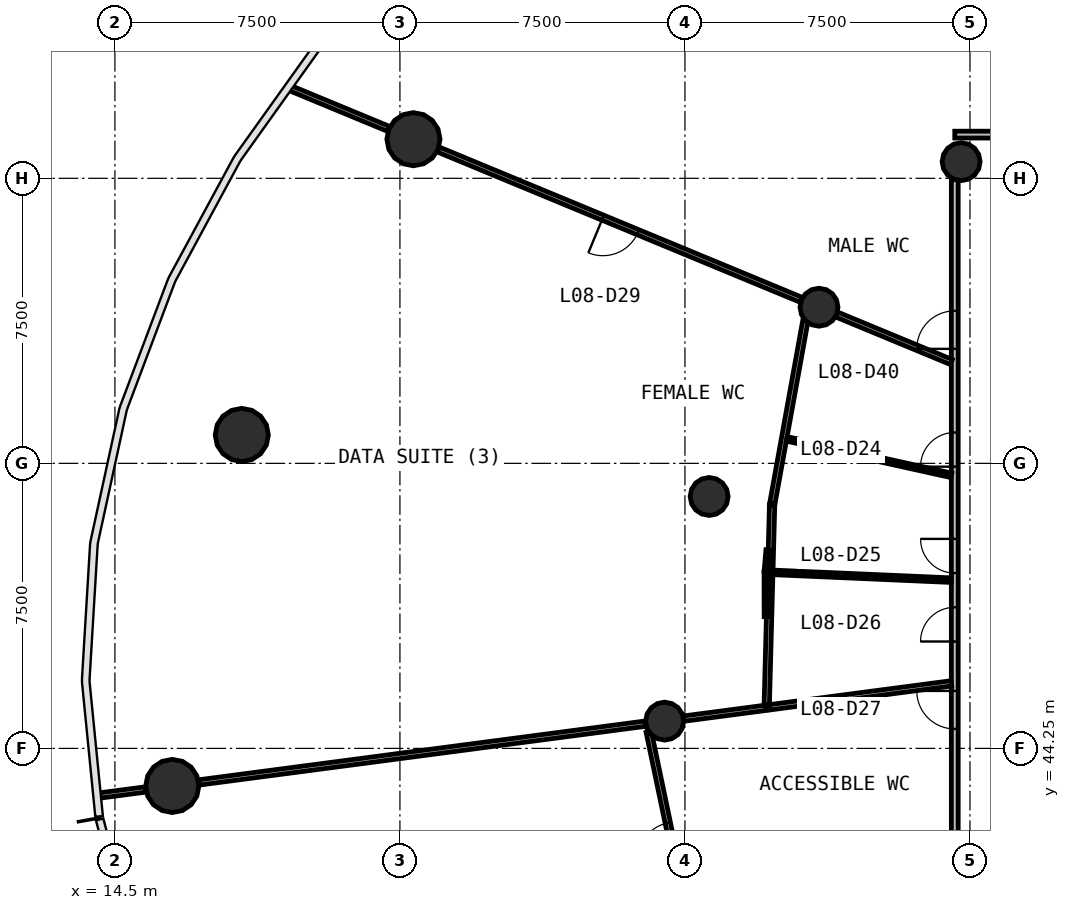
"""IFC4 building model, lengths in metres.
Left out: names, types, materials, properties, quantities, classifications, styles, units other than length and angle.
Written with IfcOpenShell. Run it as: python <this file> out.ifc"""

import sys

from ifc_helpers import new_model, si_unit, direction, frame, frame_2d, origin, origin_2d, place, context, subcontext, project, spatial, rectangle, circle, extrude, source, transform, mapped, element, fill, save


model = new_model("IFC4")
c1 = context("Model", 3, precision=1e-05, world=origin(), true_north=direction((0.0, 1.0)))
c2 = subcontext(c1, "Body", "Model", "MODEL_VIEW")
j1 = project(units=[si_unit("LENGTHUNIT", "METRE"), si_unit("PLANEANGLEUNIT", "RADIAN")], contexts=[c1])
p1 = place(None, origin())
s1 = spatial("IfcSite", under=j1, at=p1, CompositionType="ELEMENT")
p2 = place(p1, origin())
s2 = spatial("IfcBuilding", under=s1, at=p2, CompositionType="ELEMENT")
p3 = place(p2, frame((0.0, 0.0, 35.8)))
s3 = spatial("IfcBuildingStorey", under=s2, at=p3, CompositionType="ELEMENT", Elevation=35.8)
m1 = source(origin(), c2, "Body", "SweptSolid", [
    extrude(circle(Radius=0.7, at=origin_2d()), origin(), (0.0, 0.0, 1.0), 4.4),
])
for number, where, z_axis, x_axis in (
    (1, (22.355, 60.279, 0.0), (0.0, 0.0, 1.0), (1.0, 0.0, 0.0)),
    (2, (17.839, 52.497, 0.0), (0.0, 0.0, 1.0), (1.0, 0.0, 0.0)),
    (3, (16.01, 43.262, 0.0), (0.0, 0.0, 1.0), (1.0, 0.0, 0.0)),
):
    element("IfcColumn", number, at=place(p3, frame(where, z_axis=z_axis, x_axis=x_axis)), inside=s3, PredefinedType="COLUMN", context=c2, shape_type="MappedRepresentation", body=[
        mapped(m1, transform((0.0, 0.0, 0.0), scale=1.0)),
    ])
m2 = source(origin(), c2, "Body", "SweptSolid", [
    extrude(circle(Radius=0.5, at=origin_2d()), origin(), (0.0, 0.0, 1.0), 4.4),
])
for number, where, z_axis, x_axis in (
    (4, (36.768, 59.688, 0.0), (0.0, 0.0, 1.0), (1.0, 0.0, 0.0)),
    (5, (33.028, 55.859, 0.0), (0.0, 0.0, 1.0), (1.0, 0.0, 0.0)),
    (6, (30.137, 50.878, 0.0), (0.0, 0.0, 1.0), (1.0, 0.0, 0.0)),
    (7, (28.966, 44.968, 0.0), (0.0, 0.0, 1.0), (1.0, 0.0, 0.0)),
):
    element("IfcColumn", number, at=place(p3, frame(where, z_axis=z_axis, x_axis=x_axis)), inside=s3, PredefinedType="COLUMN", context=c2, shape_type="MappedRepresentation", body=[
        mapped(m2, transform((0.0, 0.0, 0.0), scale=1.0)),
    ])
p4 = place(p3, frame((36.6, 60.4, 0.0), z_axis=(0.0, 0.0, 1.0), x_axis=(1.0, 0.0, 0.0)))
e8 = element("IfcWall", 8, at=p4, inside=s3, PredefinedType="PARTITIONING", context=c2, shape_type="SweptSolid", body=[
    extrude(rectangle(XDim=30.8, YDim=0.18, at=frame_2d((15.4, 0.0))), origin(), (0.0, 0.0, 1.0), 3.05),
])
p5 = place(p4, frame((20.95, 0.0, 0.0)))
e9 = element("IfcOpeningElement", 9, at=p5, cuts=e8, PredefinedType="OPENING", context=c2, shape_type="SweptSolid", body=[
    extrude(rectangle(XDim=1.0, YDim=2.1, at=frame_2d((0.5, 1.05))), frame((0.0, 0.1, 0.0), z_axis=(0.0, -1.0, 0.0), x_axis=(1.0, 0.0, 0.0)), (0.0, 0.0, 1.0), 0.2),
])
p6 = place(p4, frame((14.95, 0.0, 0.0)))
e10 = element("IfcOpeningElement", 10, at=p6, cuts=e8, PredefinedType="OPENING", context=c2, shape_type="SweptSolid", body=[
    extrude(rectangle(XDim=1.0, YDim=2.1, at=frame_2d((0.5, 1.05))), frame((0.0, 0.1, 0.0), z_axis=(0.0, -1.0, 0.0), x_axis=(1.0, 0.0, 0.0)), (0.0, 0.0, 1.0), 0.2),
])
p7 = place(p3, frame((36.6, 35.63, 0.0), z_axis=(0.0, 0.0, 1.0), x_axis=(0.0, 1.0, 0.0)))
e11 = element("IfcWall", 11, at=p7, inside=s3, PredefinedType="PARTITIONING", context=c2, shape_type="SweptSolid", body=[
    extrude(rectangle(XDim=23.583, YDim=0.18, at=frame_2d((11.791, 0.0))), origin(), (0.0, 0.0, 1.0), 3.05),
])
p8 = place(p7, frame((16.032, 0.0, 0.0)))
e12 = element("IfcOpeningElement", 12, at=p8, cuts=e11, PredefinedType="OPENING", context=c2, shape_type="SweptSolid", body=[
    extrude(rectangle(XDim=0.9, YDim=2.1, at=frame_2d((0.45, 1.05))), frame((0.0, 0.1, 0.0), z_axis=(0.0, -1.0, 0.0), x_axis=(1.0, 0.0, 0.0)), (0.0, 0.0, 1.0), 0.2),
])
p9 = place(p7, frame((13.232, 0.0, 0.0)))
e13 = element("IfcOpeningElement", 13, at=p9, cuts=e11, PredefinedType="OPENING", context=c2, shape_type="SweptSolid", body=[
    extrude(rectangle(XDim=0.9, YDim=2.1, at=frame_2d((0.45, 1.05))), frame((0.0, 0.1, 0.0), z_axis=(0.0, -1.0, 0.0), x_axis=(1.0, 0.0, 0.0)), (0.0, 0.0, 1.0), 0.2),
])
p10 = place(p7, frame((11.433, 0.0, 0.0)))
e14 = element("IfcOpeningElement", 14, at=p10, cuts=e11, PredefinedType="OPENING", context=c2, shape_type="SweptSolid", body=[
    extrude(rectangle(XDim=0.9, YDim=2.1, at=frame_2d((0.45, 1.05))), frame((0.0, 0.1, 0.0), z_axis=(0.0, -1.0, 0.0), x_axis=(1.0, 0.0, 0.0)), (0.0, 0.0, 1.0), 0.2),
])
p11 = place(p7, frame((9.133, 0.0, 0.0)))
e15 = element("IfcOpeningElement", 15, at=p11, cuts=e11, PredefinedType="OPENING", context=c2, shape_type="SweptSolid", body=[
    extrude(rectangle(XDim=1.0, YDim=2.1, at=frame_2d((0.5, 1.05))), frame((0.0, 0.1, 0.0), z_axis=(0.0, -1.0, 0.0), x_axis=(1.0, 0.0, 0.0)), (0.0, 0.0, 1.0), 0.2),
])
p12 = place(p7, frame((19.133, 0.0, 0.0)))
e16 = element("IfcOpeningElement", 16, at=p12, cuts=e11, PredefinedType="OPENING", context=c2, shape_type="SweptSolid", body=[
    extrude(rectangle(XDim=1.0, YDim=2.1, at=frame_2d((0.5, 1.05))), frame((0.0, 0.1, 0.0), z_axis=(0.0, -1.0, 0.0), x_axis=(1.0, 0.0, 0.0)), (0.0, 0.0, 1.0), 0.2),
])
p13 = place(p3, frame((28.466, 44.902, 0.0), z_axis=(0.0, 0.0, 1.0), x_axis=(-0.991446586451, -0.130513088287, 0.0)))
e17 = element("IfcWall", 17, at=p13, inside=s3, PredefinedType="PARTITIONING", context=c2, shape_type="SweptSolid", body=[
    extrude(rectangle(XDim=11.86, YDim=0.14, at=frame_2d((5.93, 0.0))), origin(), (0.0, 0.0, 1.0), 3.05),
])
p14 = place(p3, frame((32.561, 56.052, 0.0), z_axis=(0.0, 0.0, 1.0), x_axis=(-0.923874685699, 0.382695133396, 0.0)))
e18 = element("IfcWall", 18, at=p14, inside=s3, PredefinedType="PARTITIONING", context=c2, shape_type="SweptSolid", body=[
    extrude(rectangle(XDim=10.341, YDim=0.14, at=frame_2d((5.17, 0.0))), origin(), (0.0, 0.0, 1.0), 3.05),
])
p15 = place(p14, frame((4.65, 0.0, 0.0)))
e19 = element("IfcOpeningElement", 19, at=p15, cuts=e18, PredefinedType="OPENING", context=c2, shape_type="SweptSolid", body=[
    extrude(rectangle(XDim=1.0, YDim=2.1, at=frame_2d((0.5, 1.05))), frame((0.0, 0.08, 0.0), z_axis=(0.0, -1.0, 0.0), x_axis=(1.0, 0.0, 0.0)), (0.0, 0.0, 1.0), 0.16),
])
p16 = place(p3, frame((29.774, 38.826, 0.0), z_axis=(0.0, 0.0, 1.0), x_axis=(-0.20499122911, 0.978763810113, 0.0)))
e20 = element("IfcWall", 20, at=p16, inside=s3, PredefinedType="PARTITIONING", context=c2, shape_type="SweptSolid", body=[
    extrude(rectangle(XDim=5.988, YDim=0.14, at=frame_2d((2.994, 0.0))), origin(), (0.0, 0.0, 1.0), 3.05),
])
p17 = place(p16, frame((2.538, 0.0, 0.0)))
e21 = element("IfcOpeningElement", 21, at=p17, cuts=e20, PredefinedType="OPENING", context=c2, shape_type="SweptSolid", body=[
    extrude(rectangle(XDim=1.0, YDim=2.1, at=frame_2d((0.5, 1.05))), frame((0.0, 0.08, 0.0), z_axis=(0.0, -1.0, 0.0), x_axis=(1.0, 0.0, 0.0)), (0.0, 0.0, 1.0), 0.16),
])
p18 = place(p3, frame((31.793, 50.66, 0.0), z_axis=(0.0, 0.0, 1.0), x_axis=(-0.026785082404, -0.999641215317, 0.0)))
e22 = element("IfcWall", 22, at=p18, inside=s3, PredefinedType="PARTITIONING", context=c2, shape_type="SweptSolid", body=[
    extrude(rectangle(XDim=5.341, YDim=0.14, at=frame_2d((2.671, 0.0))), origin(), (0.0, 0.0, 1.0), 3.05),
])
p19 = place(p3, frame((36.51, 45.961, 0.0), z_axis=(0.0, 0.0, 1.0), x_axis=(-0.991443283178, -0.130538179246, 0.0)))
e23 = element("IfcWall", 23, at=p19, inside=s3, PredefinedType="PARTITIONING", context=c2, shape_type="SweptSolid", body=[
    extrude(rectangle(XDim=4.831, YDim=0.14, at=frame_2d((2.416, 0.0))), origin(), (0.0, 0.0, 1.0), 3.05),
])
p20 = place(p3, frame((32.669, 55.503, 0.0), z_axis=(0.0, 0.0, 1.0), x_axis=(-0.178046403734, -0.984022092291, 0.0)))
e24 = element("IfcWall", 24, at=p20, inside=s3, PredefinedType="PARTITIONING", context=c2, shape_type="SweptSolid", body=[
    extrude(rectangle(XDim=4.891, YDim=0.14, at=frame_2d((2.446, 0.0))), origin(), (0.0, 0.0, 1.0), 3.05),
])
p21 = place(p3, frame((36.51, 54.416, 0.0), z_axis=(0.0, 0.0, 1.0), x_axis=(-0.923911109142, 0.382607190737, 0.0)))
e25 = element("IfcWall", 25, at=p21, inside=s3, PredefinedType="PARTITIONING", context=c2, shape_type="SweptSolid", body=[
    extrude(rectangle(XDim=3.264, YDim=0.14, at=frame_2d((1.632, 0.0))), origin(), (0.0, 0.0, 1.0), 3.05),
])
p22 = place(p3, frame((21.704, 60.549, 0.0), z_axis=(0.0, 0.0, 1.0), x_axis=(-0.923906214347, 0.382619010363, 0.0)))
e26 = element("IfcWall", 26, at=p22, inside=s3, PredefinedType="PARTITIONING", context=c2, shape_type="SweptSolid", body=[
    extrude(rectangle(XDim=2.797, YDim=0.14, at=frame_2d((1.399, 0.0))), origin(), (0.0, 0.0, 1.0), 3.05),
])
p23 = place(p3, frame((31.621, 45.317, 0.0), z_axis=(0.0, 0.0, 1.0), x_axis=(-0.991455060392, -0.130448699582, 0.0)))
e27 = element("IfcWall", 27, at=p23, inside=s3, PredefinedType="PARTITIONING", context=c2, shape_type="SweptSolid", body=[
    extrude(rectangle(XDim=2.173, YDim=0.14, at=frame_2d((1.086, 0.0))), origin(), (0.0, 0.0, 1.0), 3.05),
])
p24 = place(p3, frame((15.311, 43.17, 0.0), z_axis=(0.0, 0.0, 1.0), x_axis=(-0.991431129538, -0.130630453508, 0.0)))
e28 = element("IfcWall", 28, at=p24, inside=s3, PredefinedType="PARTITIONING", context=c2, shape_type="SweptSolid", body=[
    extrude(rectangle(XDim=1.22, YDim=0.14, at=frame_2d((0.61, 0.0))), origin(), (0.0, 0.0, 1.0), 3.05),
])
p25 = place(p3, frame((36.51, 48.676, 0.0), z_axis=(0.0, 0.0, 1.0), x_axis=(-0.999047117706, 0.043644662933, 0.0)))
e29 = element("IfcWall", 29, at=p25, inside=s3, PredefinedType="PARTITIONING", context=c2, shape_type="SweptSolid", body=[
    extrude(rectangle(XDim=4.699, YDim=0.12, at=frame_2d((2.349, 0.0))), origin(), (0.0, 0.0, 1.0), 3.05),
])
p26 = place(p3, frame((36.51, 51.434, 0.0), z_axis=(0.0, 0.0, 1.0), x_axis=(-0.976302150535, 0.216411900922, 0.0)))
e30 = element("IfcWall", 30, at=p26, inside=s3, PredefinedType="PARTITIONING", context=c2, shape_type="SweptSolid", body=[
    extrude(rectangle(XDim=4.437, YDim=0.12, at=frame_2d((2.219, 0.0))), origin(), (0.0, 0.0, 1.0), 3.05),
])
p27 = place(p3, frame((31.642, 48.889, 0.0), z_axis=(0.0, 0.0, 1.0), x_axis=(0.002289275999, -0.999997379604, 0.0)))
e31 = element("IfcWall", 31, at=p27, inside=s3, PredefinedType="PARTITIONING", context=c2, shape_type="SweptSolid", body=[
    extrude(rectangle(XDim=1.173, YDim=0.12, at=frame_2d((0.586, 0.0))), origin(), (0.0, 0.0, 1.0), 3.05),
])
p28 = place(p3, frame((31.691, 49.471, 0.0), z_axis=(0.0, 0.0, 1.0), x_axis=(-0.084976539901, -0.996382952316, 0.0)))
e32 = element("IfcWall", 32, at=p28, inside=s3, PredefinedType="PARTITIONING", context=c2, shape_type="SweptSolid", body=[
    extrude(rectangle(XDim=0.554, YDim=0.12, at=frame_2d((0.277, 0.0))), origin(), (0.0, 0.0, 1.0), 3.05),
])
m3 = source(origin(), c2, "Body", "SweptSolid", [
    extrude(rectangle(XDim=0.9, YDim=2.1, at=frame_2d((0.45, 1.05))), frame((0.0, 0.025, 0.0), z_axis=(0.0, -1.0, 0.0), x_axis=(1.0, 0.0, 0.0)), (0.0, 0.0, 1.0), 0.05),
])
p29 = place(p8, origin())
e33 = element("IfcDoor", 33, at=p29, inside=s3, OperationType="SINGLE_SWING_LEFT", PredefinedType="DOOR", context=c2, shape_type="MappedRepresentation", body=[
    mapped(m3, transform((0.0, 0.0, 0.0), scale=1.0)),
])
fill(e12, e33)
p30 = place(p9, origin())
e34 = element("IfcDoor", 34, at=p30, inside=s3, OperationType="SINGLE_SWING_RIGHT", PredefinedType="DOOR", context=c2, shape_type="MappedRepresentation", body=[
    mapped(m3, transform((0.0, 0.0, 0.0), scale=1.0)),
])
fill(e13, e34)
p31 = place(p10, origin())
e35 = element("IfcDoor", 35, at=p31, inside=s3, OperationType="SINGLE_SWING_LEFT", PredefinedType="DOOR", context=c2, shape_type="MappedRepresentation", body=[
    mapped(m3, transform((0.0, 0.0, 0.0), scale=1.0)),
])
fill(e14, e35)
m4 = source(origin(), c2, "Body", "SweptSolid", [
    extrude(rectangle(XDim=1.0, YDim=2.1, at=frame_2d((0.5, 1.05))), frame((0.0, 0.025, 0.0), z_axis=(0.0, -1.0, 0.0), x_axis=(1.0, 0.0, 0.0)), (0.0, 0.0, 1.0), 0.05),
])
p32 = place(p11, origin())
e36 = element("IfcDoor", 36, at=p32, inside=s3, OperationType="SINGLE_SWING_RIGHT", PredefinedType="DOOR", context=c2, shape_type="MappedRepresentation", body=[
    mapped(m4, transform((0.0, 0.0, 0.0), scale=1.0)),
])
fill(e15, e36)
p33 = place(p17, origin())
e37 = element("IfcDoor", 37, at=p33, inside=s3, OperationType="SINGLE_SWING_LEFT", PredefinedType="DOOR", context=c2, shape_type="MappedRepresentation", body=[
    mapped(m4, transform((0.0, 0.0, 0.0), scale=1.0)),
])
fill(e21, e37)
p34 = place(p15, origin())
e38 = element("IfcDoor", 38, at=p34, inside=s3, OperationType="SINGLE_SWING_RIGHT", PredefinedType="DOOR", context=c2, shape_type="MappedRepresentation", body=[
    mapped(m4, transform((0.0, 0.0, 0.0), scale=1.0)),
])
fill(e19, e38)
p35 = place(p12, origin())
e39 = element("IfcDoor", 39, at=p35, inside=s3, OperationType="SINGLE_SWING_LEFT", PredefinedType="DOOR", context=c2, shape_type="MappedRepresentation", body=[
    mapped(m4, transform((0.0, 0.0, 0.0), scale=1.0)),
])
fill(e16, e39)
save(model, sys.argv[1])
